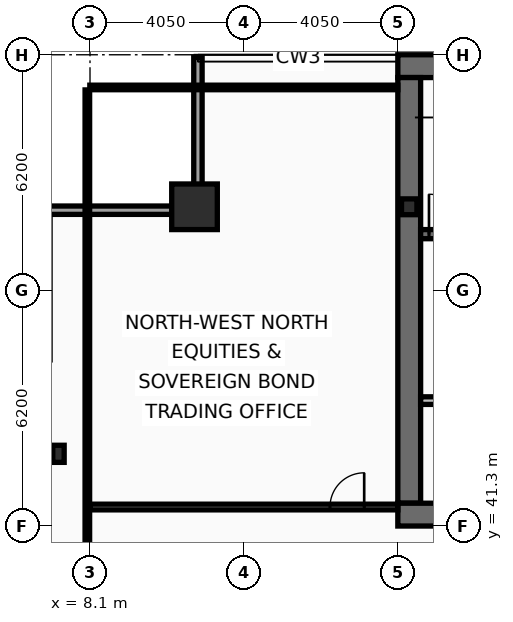
"""IFC4 building model, lengths in metres.
Left out: names, types, materials, properties, quantities, classifications, styles, units other than length and angle.
Written with IfcOpenShell. Run it as: python <this file> out.ifc"""

import sys

from ifc_helpers import new_model, si_unit, direction, frame, frame_2d, origin, origin_2d, place, context, subcontext, project, spatial, rectangle, hollow_rectangle, i_section, extrude, element, fill, save


model = new_model("IFC4")
c1 = context("Model", 3, precision=1e-05, world=origin(), true_north=direction((0.0, 1.0)))
c2 = subcontext(c1, "Body", "Model", "MODEL_VIEW")
j1 = project(units=[si_unit("LENGTHUNIT", "METRE"), si_unit("PLANEANGLEUNIT", "RADIAN")], contexts=[c1])
p1 = place(None, origin())
s1 = spatial("IfcSite", under=j1, at=p1, CompositionType="ELEMENT")
p2 = place(p1, origin())
s2 = spatial("IfcBuilding", under=s1, at=p2, CompositionType="ELEMENT")
p3 = place(p2, frame((0.0, 0.0, 221.0)))
s3 = spatial("IfcBuildingStorey", under=s2, at=p3, CompositionType="ELEMENT", Elevation=221.0)
p4 = place(p3, frame((16.2, 53.4, 0.0), z_axis=(0.0, 0.0, 1.0), x_axis=(1.0, 0.0, 0.0)))
e1 = element("IfcWall", 1, at=p4, inside=s3, PredefinedType="SHEAR", context=c2, shape_type="SweptSolid", body=[
    extrude(rectangle(XDim=40.5, YDim=0.6, at=frame_2d((20.25, 0.0))), origin(), (0.0, 0.0, 1.0), 3.44),
])
p5 = place(p3, frame((16.5, 41.9, 0.0), z_axis=(0.0, 0.0, 1.0), x_axis=(0.0, 1.0, 0.0)))
e2 = element("IfcWall", 2, at=p5, inside=s3, PredefinedType="SHEAR", context=c2, shape_type="SweptSolid", body=[
    extrude(rectangle(XDim=11.2, YDim=0.6, at=frame_2d((5.6, 0.0))), origin(), (0.0, 0.0, 1.0), 3.44),
])
p6 = place(p3, frame((18.65, 41.6, 0.0), z_axis=(0.0, 0.0, 1.0), x_axis=(-1.0, 0.0, 0.0)))
e3 = element("IfcWall", 3, at=p6, inside=s3, PredefinedType="SHEAR", context=c2, shape_type="SweptSolid", body=[
    extrude(rectangle(XDim=2.45, YDim=0.6, at=frame_2d((1.225, 0.0))), origin(), (0.0, 0.0, 1.0), 3.44),
])
p7 = place(p3, frame((16.8, 48.98, 0.0), z_axis=(0.0, 0.0, 1.0), x_axis=(1.0, 0.0, 0.0)))
e4 = element("IfcWall", 4, at=p7, inside=s3, PredefinedType="SHEAR", context=c2, shape_type="SweptSolid", body=[
    extrude(rectangle(XDim=7.42, YDim=0.24, at=frame_2d((3.71, 0.0))), origin(), (0.0, 0.0, 1.0), 3.44),
])
p8 = place(p7, frame((0.22, 0.0, 0.0)))
e5 = element("IfcOpeningElement", 5, at=p8, cuts=e4, PredefinedType="OPENING", context=c2, shape_type="SweptSolid", body=[
    extrude(rectangle(XDim=1.05, YDim=2.15, at=frame_2d((0.525, 1.075))), frame((0.0, 0.13, 0.0), z_axis=(0.0, -1.0, 0.0), x_axis=(1.0, 0.0, 0.0)), (0.0, 0.0, 1.0), 0.26),
])
p9 = place(p3, frame((10.85, 49.7, 0.0), z_axis=(0.0, 0.0, 1.0), x_axis=(1.0, 0.0, 0.0)))
e6 = element("IfcColumn", 6, at=p9, inside=s3, PredefinedType="COLUMN", context=c2, shape_type="SweptSolid", body=[
    extrude(hollow_rectangle(XDim=1.2, YDim=1.2, WallThickness=0.06, at=origin_2d()), origin(), (0.0, 0.0, 1.0), 3.6),
])
p10 = place(p3, frame((7.27, 43.2, 0.0), z_axis=(0.0, 0.0, 1.0), x_axis=(1.0, 0.0, 0.0)))
e7 = element("IfcColumn", 7, at=p10, inside=s3, PredefinedType="COLUMN", context=c2, shape_type="SweptSolid", body=[
    extrude(i_section(OverallWidth=0.3, OverallDepth=0.45, WebThickness=0.014, FlangeThickness=0.026, at=origin_2d()), origin(), (0.0, 0.0, 1.0), 3.6),
])
p11 = place(p3, frame((16.5, 49.7, 0.0), z_axis=(0.0, 0.0, 1.0), x_axis=(1.0, 0.0, 0.0)))
e8 = element("IfcColumn", 8, at=p11, inside=s3, PredefinedType="COLUMN", context=c2, shape_type="SweptSolid", body=[
    extrude(i_section(OverallWidth=0.406, OverallDepth=0.416, WebThickness=0.03, FlangeThickness=0.048, at=origin_2d()), origin(), (0.0, 0.0, 1.0), 3.6),
])
p12 = place(p3, frame((6.83, 49.61, 0.0), z_axis=(0.0, 0.0, 1.0), x_axis=(1.0, 0.0, 0.0)))
e9 = element("IfcWall", 9, at=p12, inside=s3, PredefinedType="SOLIDWALL", context=c2, shape_type="SweptSolid", body=[
    extrude(rectangle(XDim=4.22, YDim=0.22, at=frame_2d((2.11, 0.0))), origin(), (0.0, 0.0, 1.0), 2.83),
])
p13 = place(p3, frame((10.94, 49.72, 0.0), z_axis=(0.0, 0.0, 1.0), x_axis=(0.0, 1.0, 0.0)))
e10 = element("IfcWall", 10, at=p13, inside=s3, PredefinedType="SOLIDWALL", context=c2, shape_type="SweptSolid", body=[
    extrude(rectangle(XDim=3.91, YDim=0.22, at=frame_2d((1.955, 0.0))), origin(), (0.0, 0.0, 1.0), 2.83),
])
p14 = place(p3, frame((16.8, 44.6, 0.0), z_axis=(0.0, 0.0, 1.0), x_axis=(1.0, 0.0, 0.0)))
e11 = element("IfcWall", 11, at=p14, inside=s3, PredefinedType="PARTITIONING", context=c2, shape_type="SweptSolid", body=[
    extrude(rectangle(XDim=4.2, YDim=0.2, at=frame_2d((2.1, 0.0))), origin(), (0.0, 0.0, 1.0), 3.44),
])
p15 = place(p14, frame((1.25, 0.0, 0.0)))
e12 = element("IfcOpeningElement", 12, at=p15, cuts=e11, PredefinedType="OPENING", context=c2, shape_type="SweptSolid", body=[
    extrude(rectangle(XDim=1.05, YDim=2.15, at=frame_2d((0.525, 1.075))), frame((0.0, 0.11, 0.0), z_axis=(0.0, -1.0, 0.0), x_axis=(1.0, 0.0, 0.0)), (0.0, 0.0, 1.0), 0.22),
])
p16 = place(p3, frame((8.095, 41.8, 0.0), z_axis=(0.0, 0.0, 1.0), x_axis=(1.0, 0.0, 0.0)))
e13 = element("IfcWall", 13, at=p16, inside=s3, PredefinedType="PARTITIONING", context=c2, shape_type="SweptSolid", body=[
    extrude(rectangle(XDim=8.105, YDim=0.15, at=frame_2d((4.052, 0.0))), origin(), (0.0, 0.0, 1.0), 3.44),
])
p17 = place(p16, frame((6.32, 0.0, 0.0)))
e14 = element("IfcOpeningElement", 14, at=p17, cuts=e13, PredefinedType="OPENING", context=c2, shape_type="SweptSolid", body=[
    extrude(rectangle(XDim=0.9, YDim=2.05, at=frame_2d((0.45, 1.025))), frame((0.0, 0.085, 0.0), z_axis=(0.0, -1.0, 0.0), x_axis=(1.0, 0.0, 0.0)), (0.0, 0.0, 1.0), 0.17),
])
p18 = place(p3, frame((8.03, 10.665, 0.0), z_axis=(0.0, 0.0, 1.0), x_axis=(0.0, 1.0, 0.0)))
e15 = element("IfcWall", 15, at=p18, inside=s3, PredefinedType="PARTITIONING", context=c2, shape_type="SweptSolid", body=[
    extrude(rectangle(XDim=42.11, YDim=0.12, at=frame_2d((21.055, 0.0))), origin(), (0.0, 0.0, 1.0), 2.78),
])
p19 = place(p3, frame((8.095, 52.84, 0.0), z_axis=(0.0, 0.0, 1.0), x_axis=(1.0, 0.0, 0.0)))
e16 = element("IfcWall", 16, at=p19, inside=s3, PredefinedType="PARTITIONING", context=c2, shape_type="SweptSolid", body=[
    extrude(rectangle(XDim=8.105, YDim=0.12, at=frame_2d((4.052, 0.0))), origin(), (0.0, 0.0, 1.0), 3.44),
])
p20 = place(p8, origin())
e17 = element("IfcDoor", 17, at=p20, inside=s3, OperationType="SINGLE_SWING_LEFT", PredefinedType="DOOR", context=c2, shape_type="SweptSolid", body=[
    extrude(rectangle(XDim=1.05, YDim=2.15, at=frame_2d((0.525, 1.075))), frame((0.0, 0.025, 0.0), z_axis=(0.0, -1.0, 0.0), x_axis=(1.0, 0.0, 0.0)), (0.0, 0.0, 1.0), 0.05),
])
fill(e5, e17)
p21 = place(p17, origin())
e18 = element("IfcDoor", 18, at=p21, inside=s3, OperationType="SINGLE_SWING_RIGHT", PredefinedType="DOOR", context=c2, shape_type="SweptSolid", body=[
    extrude(rectangle(XDim=0.9, YDim=2.05, at=frame_2d((0.45, 1.025))), frame((0.0, 0.025, 0.0), z_axis=(0.0, -1.0, 0.0), x_axis=(1.0, 0.0, 0.0)), (0.0, 0.0, 1.0), 0.05),
])
fill(e14, e18)
save(model, sys.argv[1])
